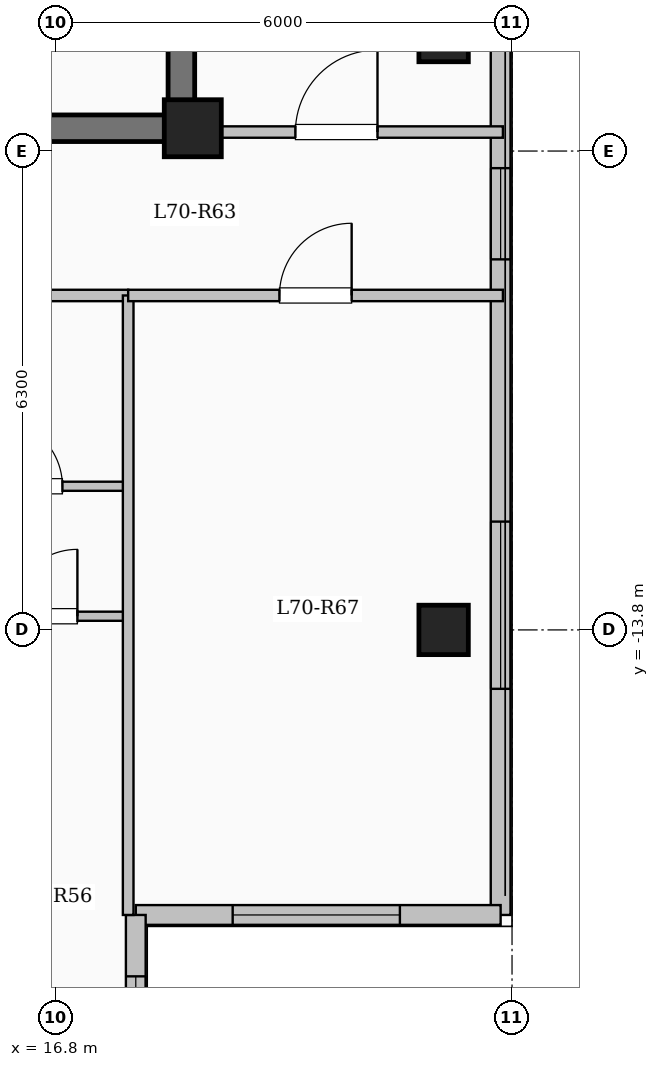
"""IFC4 building model, lengths in metres.
Left out: names, types, materials, properties, quantities, classifications, styles, units other than length and angle.
Written with IfcOpenShell. Run it as: python <this file> out.ifc"""

import sys

from ifc_helpers import new_model, si_unit, direction, frame, frame_2d, origin, origin_2d, place, context, subcontext, project, spatial, rectangle, extrude, element, fill, save


model = new_model("IFC4")
c1 = context("Model", 3, precision=1e-05, world=origin(), true_north=direction((0.0, 1.0)))
c2 = subcontext(c1, "Body", "Model", "MODEL_VIEW")
j1 = project(units=[si_unit("LENGTHUNIT", "METRE"), si_unit("PLANEANGLEUNIT", "RADIAN")], contexts=[c1])
p1 = place(None, origin())
s1 = spatial("IfcSite", under=j1, at=p1, CompositionType="ELEMENT")
p2 = place(p1, origin())
s2 = spatial("IfcBuilding", under=s1, at=p2, CompositionType="ELEMENT")
p3 = place(p2, frame((0.0, 0.0, 258.25)))
s3 = spatial("IfcBuildingStorey", under=s2, at=p3, CompositionType="ELEMENT", Elevation=258.25)
p4 = place(p3, frame((18.6, -7.2, 0.0), z_axis=(0.0, 0.0, 1.0), x_axis=(1.0, 0.0, 0.0)))
e1 = element("IfcColumn", 1, at=p4, inside=s3, PredefinedType="COLUMN", context=c2, shape_type="SweptSolid", body=[
    extrude(rectangle(XDim=0.75, YDim=0.75, at=origin_2d()), origin(), (0.0, 0.0, 1.0), 3.35),
])
for number, where, z_axis, x_axis in (
    (2, (21.9, -13.8, 0.0), (0.0, 0.0, 1.0), (1.0, 0.0, 0.0)),
    (3, (21.9, -6.0, 0.0), (0.0, 0.0, 1.0), (1.0, 0.0, 0.0)),
):
    element("IfcColumn", number, at=place(p3, frame(where, z_axis=z_axis, x_axis=x_axis)), inside=s3, PredefinedType="COLUMN", context=c2, shape_type="SweptSolid", body=[
        extrude(rectangle(XDim=0.65, YDim=0.65, at=origin_2d()), origin(), (0.0, 0.0, 1.0), 3.35),
    ])
p5 = place(p3, frame((22.65, 17.55, 0.0), z_axis=(0.0, 0.0, 1.0), x_axis=(0.0, -1.0, 0.0)))
e4 = element("IfcWall", 4, at=p5, inside=s3, PredefinedType="SOLIDWALL", context=c2, shape_type="SweptSolid", body=[
    extrude(rectangle(XDim=35.1, YDim=0.26, at=frame_2d((17.55, 0.0))), origin(), (0.0, 0.0, 1.0), 3.1),
])
p6 = place(p5, frame((1.525, 0.0, 0.9)))
e5 = element("IfcOpeningElement", 5, at=p6, cuts=e4, PredefinedType="OPENING", context=c2, shape_type="SweptSolid", body=[
    extrude(rectangle(XDim=2.0, YDim=1.7, at=frame_2d((1.0, 0.85))), frame((0.0, 0.14, 0.0), z_axis=(0.0, -1.0, 0.0), x_axis=(1.0, 0.0, 0.0)), (0.0, 0.0, 1.0), 0.28),
])
p7 = place(p5, frame((5.425, 0.0, 0.95)))
e6 = element("IfcOpeningElement", 6, at=p7, cuts=e4, PredefinedType="OPENING", context=c2, shape_type="SweptSolid", body=[
    extrude(rectangle(XDim=1.0, YDim=1.5, at=frame_2d((0.5, 0.75))), frame((0.0, 0.14, 0.0), z_axis=(0.0, -1.0, 0.0), x_axis=(1.0, 0.0, 0.0)), (0.0, 0.0, 1.0), 0.28),
])
p8 = place(p5, frame((14.8, 0.0, 0.9)))
e7 = element("IfcOpeningElement", 7, at=p8, cuts=e4, PredefinedType="OPENING", context=c2, shape_type="SweptSolid", body=[
    extrude(rectangle(XDim=2.0, YDim=1.7, at=frame_2d((1.0, 0.85))), frame((0.0, 0.14, 0.0), z_axis=(0.0, -1.0, 0.0), x_axis=(1.0, 0.0, 0.0)), (0.0, 0.0, 1.0), 0.28),
])
p9 = place(p5, frame((25.275, 0.0, 0.95)))
e8 = element("IfcOpeningElement", 8, at=p9, cuts=e4, PredefinedType="OPENING", context=c2, shape_type="SweptSolid", body=[
    extrude(rectangle(XDim=1.2, YDim=1.5, at=frame_2d((0.6, 0.75))), frame((0.0, 0.14, 0.0), z_axis=(0.0, -1.0, 0.0), x_axis=(1.0, 0.0, 0.0)), (0.0, 0.0, 1.0), 0.28),
])
p10 = place(p5, frame((29.925, 0.0, 0.9)))
e9 = element("IfcOpeningElement", 9, at=p10, cuts=e4, PredefinedType="OPENING", context=c2, shape_type="SweptSolid", body=[
    extrude(rectangle(XDim=2.2, YDim=1.75, at=frame_2d((1.1, 0.875))), frame((0.0, 0.14, 0.0), z_axis=(0.0, -1.0, 0.0), x_axis=(1.0, 0.0, 0.0)), (0.0, 0.0, 1.0), 0.28),
])
p11 = place(p3, frame((22.65, -17.55, 0.0), z_axis=(0.0, 0.0, 1.0), x_axis=(-1.0, 0.0, 0.0)))
e10 = element("IfcWall", 10, at=p11, inside=s3, PredefinedType="SOLIDWALL", context=c2, shape_type="SweptSolid", body=[
    extrude(rectangle(XDim=4.8, YDim=0.26, at=frame_2d((2.4, 0.0))), origin(), (0.0, 0.0, 1.0), 3.1),
])
p12 = place(p11, frame((1.325, 0.0, 0.9)))
e11 = element("IfcOpeningElement", 11, at=p12, cuts=e10, PredefinedType="OPENING", context=c2, shape_type="SweptSolid", body=[
    extrude(rectangle(XDim=2.2, YDim=1.75, at=frame_2d((1.1, 0.875))), frame((0.0, 0.14, 0.0), z_axis=(0.0, -1.0, 0.0), x_axis=(1.0, 0.0, 0.0)), (0.0, 0.0, 1.0), 0.28),
])
p13 = place(p3, frame((17.85, -17.55, 0.0), z_axis=(0.0, 0.0, 1.0), x_axis=(0.0, -1.0, 0.0)))
e12 = element("IfcWall", 12, at=p13, inside=s3, PredefinedType="SOLIDWALL", context=c2, shape_type="SweptSolid", body=[
    extrude(rectangle(XDim=3.3, YDim=0.26, at=frame_2d((1.65, 0.0))), origin(), (0.0, 0.0, 1.0), 3.1),
])
p14 = place(p13, frame((0.808, 0.0, 0.9)))
e13 = element("IfcOpeningElement", 13, at=p14, cuts=e12, PredefinedType="OPENING", context=c2, shape_type="SweptSolid", body=[
    extrude(rectangle(XDim=1.65, YDim=1.6, at=frame_2d((0.825, 0.8))), frame((0.0, 0.14, 0.0), z_axis=(0.0, -1.0, 0.0), x_axis=(1.0, 0.0, 0.0)), (0.0, 0.0, 1.0), 0.28),
])
p15 = place(p3, frame((18.45, -7.375, 0.0), z_axis=(0.0, 0.0, 1.0), x_axis=(0.0, 1.0, 0.0)))
e14 = element("IfcWall", 14, at=p15, inside=s3, PredefinedType="SHEAR", context=c2, shape_type="SweptSolid", body=[
    extrude(rectangle(XDim=14.05, YDim=0.35, at=frame_2d((7.025, 0.0))), origin(), (0.0, 0.0, 1.0), 3.35),
])
p16 = place(p3, frame((12.625, -7.2, 0.0), z_axis=(0.0, 0.0, 1.0), x_axis=(1.0, 0.0, 0.0)))
e15 = element("IfcWall", 15, at=p16, inside=s3, PredefinedType="SHEAR", context=c2, shape_type="SweptSolid", body=[
    extrude(rectangle(XDim=6.0, YDim=0.35, at=frame_2d((3.0, 0.0))), origin(), (0.0, 0.0, 1.0), 3.35),
])
p17 = place(p3, frame((8.55, -9.4, 0.0), z_axis=(0.0, 0.0, 1.0), x_axis=(1.0, 0.0, 0.0)))
e16 = element("IfcWall", 16, at=p17, inside=s3, PredefinedType="PARTITIONING", context=c2, shape_type="SweptSolid", body=[
    extrude(rectangle(XDim=9.2, YDim=0.15, at=frame_2d((4.6, 0.0))), origin(), (0.0, 0.0, 1.0), 3.1),
])
p18 = place(p17, frame((0.75, 0.0, 0.0)))
e17 = element("IfcOpeningElement", 17, at=p18, cuts=e16, PredefinedType="OPENING", context=c2, shape_type="SweptSolid", body=[
    extrude(rectangle(XDim=0.96, YDim=2.15, at=frame_2d((0.48, 1.075))), frame((0.0, 0.085, 0.0), z_axis=(0.0, -1.0, 0.0), x_axis=(1.0, 0.0, 0.0)), (0.0, 0.0, 1.0), 0.17),
])
p19 = place(p3, frame((15.14, -11.91, 0.0), z_axis=(0.0, 0.0, 1.0), x_axis=(1.0, 0.0, 0.0)))
e18 = element("IfcWall", 18, at=p19, inside=s3, PredefinedType="PARTITIONING", context=c2, shape_type="SweptSolid", body=[
    extrude(rectangle(XDim=2.61, YDim=0.12, at=frame_2d((1.305, 0.0))), origin(), (0.0, 0.0, 1.0), 3.1),
])
p20 = place(p19, frame((0.865, 0.0, 0.0)))
e19 = element("IfcOpeningElement", 19, at=p20, cuts=e18, PredefinedType="OPENING", context=c2, shape_type="SweptSolid", body=[
    extrude(rectangle(XDim=0.88, YDim=2.1, at=frame_2d((0.44, 1.05))), frame((0.0, 0.07, 0.0), z_axis=(0.0, -1.0, 0.0), x_axis=(1.0, 0.0, 0.0)), (0.0, 0.0, 1.0), 0.14),
])
p21 = place(p3, frame((11.7, -13.62, 0.0), z_axis=(0.0, 0.0, 1.0), x_axis=(1.0, 0.0, 0.0)))
e20 = element("IfcWall", 20, at=p21, inside=s3, PredefinedType="PARTITIONING", context=c2, shape_type="SweptSolid", body=[
    extrude(rectangle(XDim=6.11, YDim=0.12, at=frame_2d((3.055, 0.0))), origin(), (0.0, 0.0, 1.0), 3.1),
])
p22 = place(p21, frame((0.548, 0.0, 0.0)))
e21 = element("IfcOpeningElement", 21, at=p22, cuts=e20, PredefinedType="OPENING", context=c2, shape_type="SweptSolid", body=[
    extrude(rectangle(XDim=0.88, YDim=2.1, at=frame_2d((0.44, 1.05))), frame((0.0, 0.07, 0.0), z_axis=(0.0, -1.0, 0.0), x_axis=(1.0, 0.0, 0.0)), (0.0, 0.0, 1.0), 0.14),
])
p23 = place(p21, frame((2.525, 0.0, 0.0)))
e22 = element("IfcOpeningElement", 22, at=p23, cuts=e20, PredefinedType="OPENING", context=c2, shape_type="SweptSolid", body=[
    extrude(rectangle(XDim=0.88, YDim=2.1, at=frame_2d((0.44, 1.05))), frame((0.0, 0.07, 0.0), z_axis=(0.0, -1.0, 0.0), x_axis=(1.0, 0.0, 0.0)), (0.0, 0.0, 1.0), 0.14),
])
p24 = place(p21, frame((4.502, 0.0, 0.0)))
e23 = element("IfcOpeningElement", 23, at=p24, cuts=e20, PredefinedType="OPENING", context=c2, shape_type="SweptSolid", body=[
    extrude(rectangle(XDim=0.88, YDim=2.1, at=frame_2d((0.44, 1.05))), frame((0.0, 0.07, 0.0), z_axis=(0.0, -1.0, 0.0), x_axis=(1.0, 0.0, 0.0)), (0.0, 0.0, 1.0), 0.14),
])
p25 = place(p3, frame((18.45, -7.25, 0.0), z_axis=(0.0, 0.0, 1.0), x_axis=(1.0, 0.0, 0.0)))
e24 = element("IfcWall", 24, at=p25, inside=s3, PredefinedType="PARTITIONING", context=c2, shape_type="SweptSolid", body=[
    extrude(rectangle(XDim=4.23, YDim=0.15, at=frame_2d((2.115, 0.0))), origin(), (0.0, 0.0, 1.0), 3.1),
])
p26 = place(p25, frame((1.5, 0.0, 0.0)))
e25 = element("IfcOpeningElement", 25, at=p26, cuts=e24, PredefinedType="OPENING", context=c2, shape_type="SweptSolid", body=[
    extrude(rectangle(XDim=1.08, YDim=2.15, at=frame_2d((0.54, 1.075))), frame((0.0, 0.085, 0.0), z_axis=(0.0, -1.0, 0.0), x_axis=(1.0, 0.0, 0.0)), (0.0, 0.0, 1.0), 0.17),
])
p27 = place(p3, frame((17.75, -17.55, 0.0), z_axis=(0.0, 0.0, 1.0), x_axis=(0.0, 1.0, 0.0)))
e26 = element("IfcWall", 26, at=p27, inside=s3, PredefinedType="PARTITIONING", context=c2, shape_type="SweptSolid", body=[
    extrude(rectangle(XDim=8.15, YDim=0.14, at=frame_2d((4.075, 0.0))), origin(), (0.0, 0.0, 1.0), 3.1),
])
p28 = place(p3, frame((17.75, -9.4, 0.0), z_axis=(0.0, 0.0, 1.0), x_axis=(1.0, 0.0, 0.0)))
e27 = element("IfcWall", 27, at=p28, inside=s3, PredefinedType="PARTITIONING", context=c2, shape_type="SweptSolid", body=[
    extrude(rectangle(XDim=4.93, YDim=0.15, at=frame_2d((2.465, 0.0))), origin(), (0.0, 0.0, 1.0), 3.1),
])
p29 = place(p28, frame((1.99, 0.0, 0.0)))
e28 = element("IfcOpeningElement", 28, at=p29, cuts=e27, PredefinedType="OPENING", context=c2, shape_type="SweptSolid", body=[
    extrude(rectangle(XDim=0.95, YDim=2.15, at=frame_2d((0.475, 1.075))), frame((0.0, 0.085, 0.0), z_axis=(0.0, -1.0, 0.0), x_axis=(1.0, 0.0, 0.0)), (0.0, 0.0, 1.0), 0.17),
])
p30 = place(p9, origin())
e29 = element("IfcWindow", 29, at=p30, inside=s3, PartitioningType="SINGLE_PANEL", PredefinedType="WINDOW", context=c2, shape_type="SweptSolid", body=[
    extrude(rectangle(XDim=1.2, YDim=1.5, at=frame_2d((0.6, 0.75))), frame((0.0, 0.03, 0.0), z_axis=(0.0, -1.0, 0.0), x_axis=(1.0, 0.0, 0.0)), (0.0, 0.0, 1.0), 0.06),
])
fill(e8, e29)
p31 = place(p10, origin())
e30 = element("IfcWindow", 30, at=p31, inside=s3, PartitioningType="SINGLE_PANEL", PredefinedType="WINDOW", context=c2, shape_type="SweptSolid", body=[
    extrude(rectangle(XDim=2.2, YDim=1.75, at=frame_2d((1.1, 0.875))), frame((0.0, 0.03, 0.0), z_axis=(0.0, -1.0, 0.0), x_axis=(1.0, 0.0, 0.0)), (0.0, 0.0, 1.0), 0.06),
])
fill(e9, e30)
p32 = place(p12, origin())
e31 = element("IfcWindow", 31, at=p32, inside=s3, PartitioningType="SINGLE_PANEL", PredefinedType="WINDOW", context=c2, shape_type="SweptSolid", body=[
    extrude(rectangle(XDim=2.2, YDim=1.75, at=frame_2d((1.1, 0.875))), frame((0.0, 0.03, 0.0), z_axis=(0.0, -1.0, 0.0), x_axis=(1.0, 0.0, 0.0)), (0.0, 0.0, 1.0), 0.06),
])
fill(e11, e31)
p33 = place(p14, origin())
e32 = element("IfcWindow", 32, at=p33, inside=s3, PartitioningType="SINGLE_PANEL", PredefinedType="WINDOW", context=c2, shape_type="SweptSolid", body=[
    extrude(rectangle(XDim=1.65, YDim=1.6, at=frame_2d((0.825, 0.8))), frame((0.0, 0.03, 0.0), z_axis=(0.0, -1.0, 0.0), x_axis=(1.0, 0.0, 0.0)), (0.0, 0.0, 1.0), 0.06),
])
fill(e13, e32)
p34 = place(p20, origin())
e33 = element("IfcDoor", 33, at=p34, inside=s3, OperationType="SINGLE_SWING_LEFT", PredefinedType="DOOR", context=c2, shape_type="SweptSolid", body=[
    extrude(rectangle(XDim=0.88, YDim=2.1, at=frame_2d((0.44, 1.05))), frame((0.0, 0.025, 0.0), z_axis=(0.0, -1.0, 0.0), x_axis=(1.0, 0.0, 0.0)), (0.0, 0.0, 1.0), 0.05),
])
fill(e19, e33)
p35 = place(p24, origin())
e34 = element("IfcDoor", 34, at=p35, inside=s3, OperationType="SINGLE_SWING_RIGHT", PredefinedType="DOOR", context=c2, shape_type="SweptSolid", body=[
    extrude(rectangle(XDim=0.88, YDim=2.1, at=frame_2d((0.44, 1.05))), frame((0.0, 0.025, 0.0), z_axis=(0.0, -1.0, 0.0), x_axis=(1.0, 0.0, 0.0)), (0.0, 0.0, 1.0), 0.05),
])
fill(e23, e34)
p36 = place(p29, origin())
e35 = element("IfcDoor", 35, at=p36, inside=s3, OperationType="SINGLE_SWING_RIGHT", PredefinedType="DOOR", context=c2, shape_type="SweptSolid", body=[
    extrude(rectangle(XDim=0.95, YDim=2.15, at=frame_2d((0.475, 1.075))), frame((0.0, 0.025, 0.0), z_axis=(0.0, -1.0, 0.0), x_axis=(1.0, 0.0, 0.0)), (0.0, 0.0, 1.0), 0.05),
])
fill(e28, e35)
p37 = place(p26, origin())
e36 = element("IfcDoor", 36, at=p37, inside=s3, OperationType="SINGLE_SWING_RIGHT", PredefinedType="DOOR", context=c2, shape_type="SweptSolid", body=[
    extrude(rectangle(XDim=1.08, YDim=2.15, at=frame_2d((0.54, 1.075))), frame((0.0, 0.025, 0.0), z_axis=(0.0, -1.0, 0.0), x_axis=(1.0, 0.0, 0.0)), (0.0, 0.0, 1.0), 0.05),
])
fill(e25, e36)
save(model, sys.argv[1])
